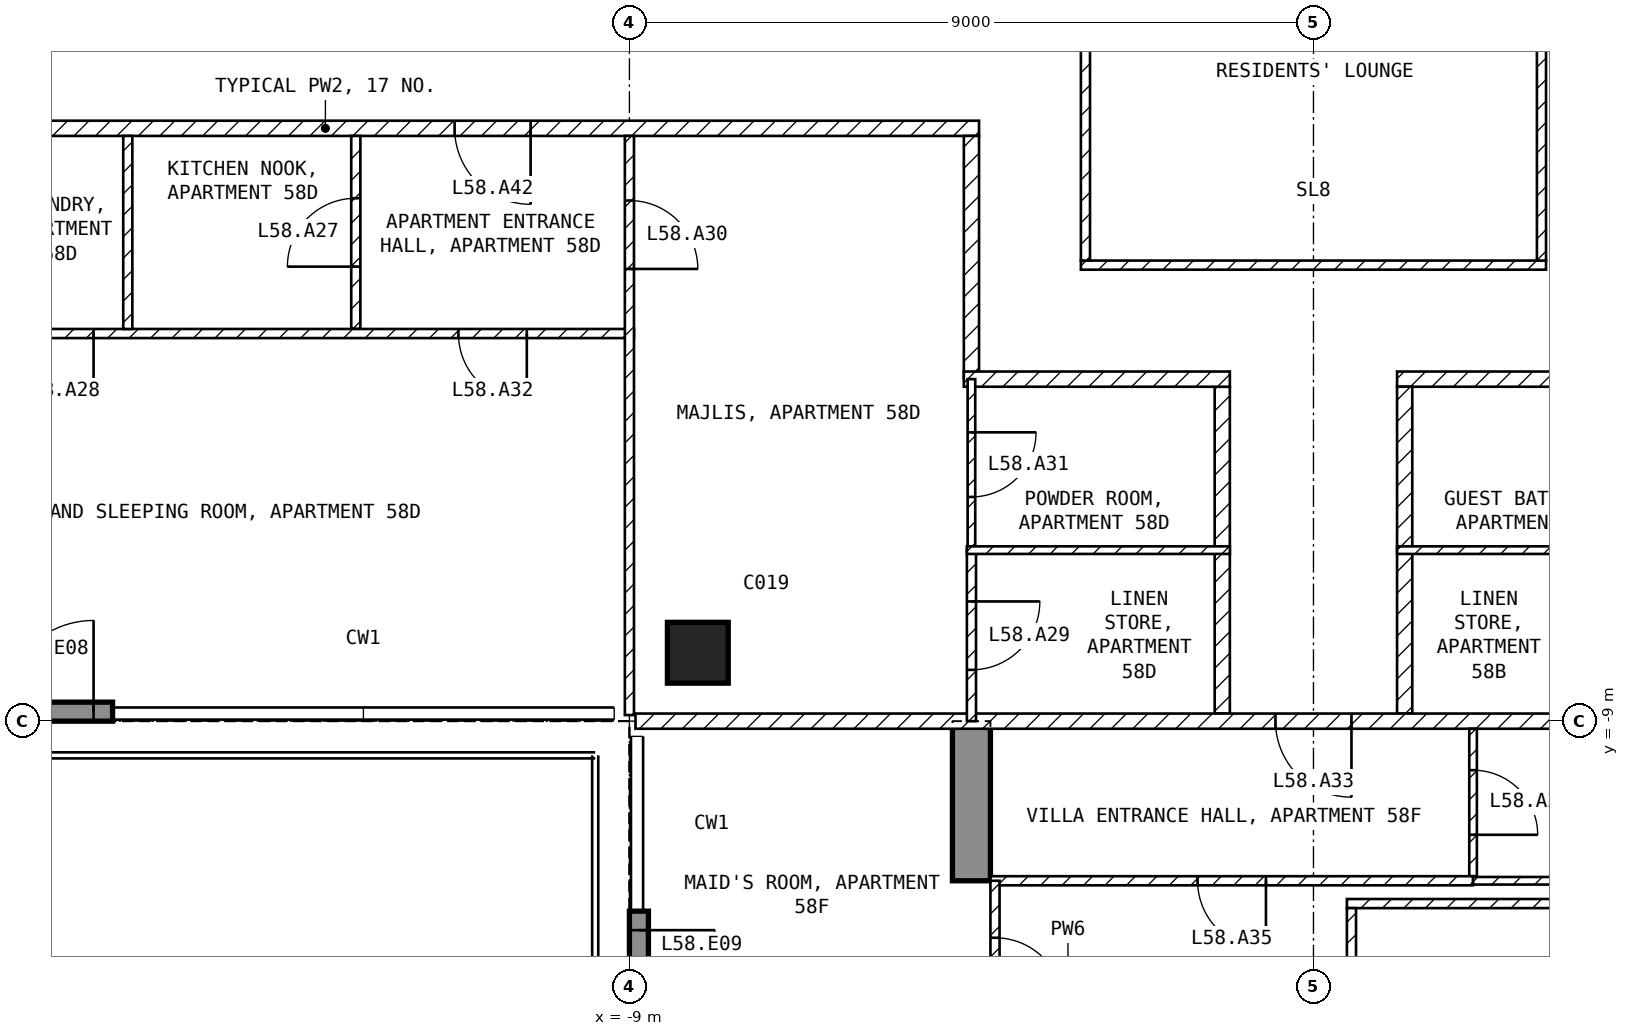
"""IFC4 building model, lengths in metres.
Left out: names, types, materials, properties, quantities, classifications, styles, units other than length and angle.
Written with IfcOpenShell. Run it as: python <this file> out.ifc"""

import sys

from ifc_helpers import new_model, si_unit, direction, frame, frame_2d, origin, origin_2d, place, context, subcontext, project, spatial, polyline, rectangle, outline, extrude, element, fill, save


model = new_model("IFC4")
c1 = context("Model", 3, precision=1e-05, world=origin(), true_north=direction((0.0, 1.0)))
c2 = subcontext(c1, "Body", "Model", "MODEL_VIEW")
j1 = project(units=[si_unit("LENGTHUNIT", "METRE"), si_unit("PLANEANGLEUNIT", "RADIAN")], contexts=[c1])
p1 = place(None, origin())
s1 = spatial("IfcSite", under=j1, at=p1, CompositionType="ELEMENT")
p2 = place(p1, origin())
s2 = spatial("IfcBuilding", under=s1, at=p2, CompositionType="ELEMENT")
p3 = place(p2, frame((0.0, 0.0, 232.5)))
s3 = spatial("IfcBuildingStorey", under=s2, at=p3, CompositionType="ELEMENT", Elevation=232.5)
p4 = place(p3, frame((-8.1, -8.1, -0.25), z_axis=(0.0, 0.0, 1.0), x_axis=(1.0, 0.0, 0.0)))
e1 = element("IfcColumn", 1, at=p4, inside=s3, PredefinedType="COLUMN", context=c2, shape_type="SweptSolid", body=[
    extrude(rectangle(XDim=0.8, YDim=0.8, at=origin_2d()), origin(), (0.0, 0.0, 1.0), 3.5),
])
p5 = place(p3, frame((-4.75, -16.7, -0.25), z_axis=(1.0, 0.0, 0.0), x_axis=(0.0, 1.0, 0.0)))
e2 = element("IfcWall", 2, at=p5, inside=s3, PredefinedType="SHEAR", context=c2, shape_type="SweptSolid", body=[
    extrude(outline(polyline([(0.0, 0.0), (3.2, 0.0), (3.2, 2.65), (5.6, 2.65), (5.6, 0.0), (7.7, 0.0), (7.7, 3.5), (0.0, 3.5), (0.0, 0.0)])), origin(), (0.0, 0.0, 1.0), 0.5),
])
p6 = place(p3, frame((-17.8, -8.875, 0.0), z_axis=(0.0, 0.0, 1.0), x_axis=(1.0, 0.0, 0.0)))
e3 = element("IfcWall", 3, at=p6, inside=s3, PredefinedType="SOLIDWALL", context=c2, shape_type="SweptSolid", body=[
    extrude(rectangle(XDim=2.0, YDim=0.25, at=frame_2d((1.0, 0.0))), origin(), (0.0, 0.0, 1.0), 3.25),
])
p7 = place(p6, frame((0.55, 0.0, 0.0)))
e4 = element("IfcOpeningElement", 4, at=p7, cuts=e3, PredefinedType="OPENING", context=c2, shape_type="SweptSolid", body=[
    extrude(rectangle(XDim=1.2, YDim=2.4, at=frame_2d((0.6, 1.2))), frame((0.0, 0.135, 0.0), z_axis=(0.0, -1.0, 0.0), x_axis=(1.0, 0.0, 0.0)), (0.0, 0.0, 1.0), 0.27),
])
p8 = place(p3, frame((-8.875, -11.5, 0.0), z_axis=(0.0, 0.0, 1.0), x_axis=(0.0, -1.0, 0.0)))
e5 = element("IfcWall", 5, at=p8, inside=s3, PredefinedType="SOLIDWALL", context=c2, shape_type="SweptSolid", body=[
    extrude(rectangle(XDim=2.7, YDim=0.25, at=frame_2d((1.35, 0.0))), origin(), (0.0, 0.0, 1.0), 3.25),
])
p9 = place(p8, frame((0.25, 0.0, 0.0)))
e6 = element("IfcOpeningElement", 6, at=p9, cuts=e5, PredefinedType="OPENING", context=c2, shape_type="SweptSolid", body=[
    extrude(rectangle(XDim=1.0, YDim=2.4, at=frame_2d((0.5, 1.2))), frame((0.0, 0.135, 0.0), z_axis=(0.0, -1.0, 0.0), x_axis=(1.0, 0.0, 0.0)), (0.0, 0.0, 1.0), 0.27),
])
p10 = place(p3, frame((-3.06, -3.0, 0.0), z_axis=(0.0, 0.0, 1.0), x_axis=(1.0, 0.0, 0.0)))
e7 = element("IfcWall", 7, at=p10, inside=s3, PredefinedType="PARTITIONING", context=c2, shape_type="SweptSolid", body=[
    extrude(rectangle(XDim=6.12, YDim=0.12, at=frame_2d((3.06, 0.0))), origin(), (0.0, 0.0, 1.0), 3.25),
])
for number, where, z_axis, x_axis in (
    (8, (3.0, -2.94, 0.0), (0.0, 0.0, 1.0), (0.0, 1.0, 0.0)),
    (9, (-3.0, 2.94, 0.0), (0.0, 0.0, 1.0), (0.0, -1.0, 0.0)),
):
    element("IfcWall", number, at=place(p3, frame(where, z_axis=z_axis, x_axis=x_axis)), inside=s3, PredefinedType="PARTITIONING", context=c2, shape_type="SweptSolid", body=[
        extrude(rectangle(XDim=5.88, YDim=0.12, at=frame_2d((2.94, 0.0))), origin(), (0.0, 0.0, 1.0), 3.25),
    ])
p11 = place(p3, frame((4.6, -4.5, 0.0), z_axis=(0.0, 0.0, 1.0), x_axis=(-1.0, 0.0, 0.0)))
e10 = element("IfcWall", 10, at=p11, inside=s3, PredefinedType="PARTITIONING", context=c2, shape_type="SweptSolid", body=[
    extrude(rectangle(XDim=3.5, YDim=0.2, at=frame_2d((1.75, 0.0))), origin(), (0.0, 0.0, 1.0), 3.25),
])
p12 = place(p3, frame((1.2, -4.6, 0.0), z_axis=(0.0, 0.0, 1.0), x_axis=(0.0, -1.0, 0.0)))
e11 = element("IfcWall", 11, at=p12, inside=s3, PredefinedType="PARTITIONING", context=c2, shape_type="SweptSolid", body=[
    extrude(rectangle(XDim=4.3, YDim=0.2, at=frame_2d((2.15, 0.0))), origin(), (0.0, 0.0, 1.0), 3.25),
])
p13 = place(p3, frame((-4.4, -1.2, 0.0), z_axis=(0.0, 0.0, 1.0), x_axis=(-1.0, 0.0, 0.0)))
e12 = element("IfcWall", 12, at=p13, inside=s3, PredefinedType="PARTITIONING", context=c2, shape_type="SweptSolid", body=[
    extrude(rectangle(XDim=17.2, YDim=0.2, at=frame_2d((8.6, 0.0))), origin(), (0.0, 0.0, 1.0), 3.25),
])
p14 = place(p13, frame((5.9, 0.0, 0.0)))
e13 = element("IfcOpeningElement", 13, at=p14, cuts=e12, PredefinedType="OPENING", context=c2, shape_type="SweptSolid", body=[
    extrude(rectangle(XDim=1.0, YDim=2.1, at=frame_2d((0.5, 1.05))), frame((0.0, 0.11, 0.0), z_axis=(0.0, -1.0, 0.0), x_axis=(1.0, 0.0, 0.0)), (0.0, 0.0, 1.0), 0.22),
])
p15 = place(p3, frame((-4.5, -4.5, 0.0), z_axis=(0.0, 0.0, 1.0), x_axis=(0.0, 1.0, 0.0)))
e14 = element("IfcWall", 14, at=p15, inside=s3, PredefinedType="PARTITIONING", context=c2, shape_type="SweptSolid", body=[
    extrude(rectangle(XDim=3.2, YDim=0.2, at=frame_2d((1.6, 0.0))), origin(), (0.0, 0.0, 1.0), 3.25),
])
p16 = place(p3, frame((-1.2, -8.9, 0.0), z_axis=(0.0, 0.0, 1.0), x_axis=(0.0, 1.0, 0.0)))
e15 = element("IfcWall", 15, at=p16, inside=s3, PredefinedType="PARTITIONING", context=c2, shape_type="SweptSolid", body=[
    extrude(rectangle(XDim=4.3, YDim=0.2, at=frame_2d((2.15, 0.0))), origin(), (0.0, 0.0, 1.0), 3.25),
])
p17 = place(p3, frame((-1.1, -4.5, 0.0), z_axis=(0.0, 0.0, 1.0), x_axis=(-1.0, 0.0, 0.0)))
e16 = element("IfcWall", 16, at=p17, inside=s3, PredefinedType="PARTITIONING", context=c2, shape_type="SweptSolid", body=[
    extrude(rectangle(XDim=3.5, YDim=0.2, at=frame_2d((1.75, 0.0))), origin(), (0.0, 0.0, 1.0), 3.25),
])
p18 = place(p3, frame((8.92, -9.0, 0.0), z_axis=(0.0, 0.0, 1.0), x_axis=(-1.0, 0.0, 0.0)))
e17 = element("IfcWall", 17, at=p18, inside=s3, PredefinedType="PARTITIONING", context=c2, shape_type="SweptSolid", body=[
    extrude(rectangle(XDim=17.84, YDim=0.2, at=frame_2d((8.92, 0.0))), origin(), (0.0, 0.0, 1.0), 3.25),
])
p19 = place(p18, frame((8.42, 0.0, 0.0)))
e18 = element("IfcOpeningElement", 18, at=p19, cuts=e17, PredefinedType="OPENING", context=c2, shape_type="SweptSolid", body=[
    extrude(rectangle(XDim=1.0, YDim=2.1, at=frame_2d((0.5, 1.05))), frame((0.0, 0.11, 0.0), z_axis=(0.0, -1.0, 0.0), x_axis=(1.0, 0.0, 0.0)), (0.0, 0.0, 1.0), 0.22),
])
p20 = place(p3, frame((4.56, -6.75, 0.0), z_axis=(0.0, 0.0, 1.0), x_axis=(-1.0, 0.0, 0.0)))
e19 = element("IfcWall", 19, at=p20, inside=s3, PredefinedType="PARTITIONING", context=c2, shape_type="SweptSolid", body=[
    extrude(rectangle(XDim=3.46, YDim=0.1, at=frame_2d((1.73, 0.0))), origin(), (0.0, 0.0, 1.0), 3.25),
])
p21 = place(p3, frame((-12.6, -3.84, 0.0), z_axis=(0.0, 0.0, 1.0), x_axis=(0.0, 1.0, 0.0)))
e20 = element("IfcWall", 20, at=p21, inside=s3, PredefinedType="PARTITIONING", context=c2, shape_type="SweptSolid", body=[
    extrude(rectangle(XDim=2.54, YDim=0.12, at=frame_2d((1.27, 0.0))), origin(), (0.0, 0.0, 1.0), 3.25),
])
p22 = place(p21, frame((0.82, 0.0, 0.0)))
e21 = element("IfcOpeningElement", 21, at=p22, cuts=e20, PredefinedType="OPENING", context=c2, shape_type="SweptSolid", body=[
    extrude(rectangle(XDim=0.9, YDim=2.1, at=frame_2d((0.45, 1.05))), frame((0.0, 0.07, 0.0), z_axis=(0.0, -1.0, 0.0), x_axis=(1.0, 0.0, 0.0)), (0.0, 0.0, 1.0), 0.14),
])
p23 = place(p3, frame((-8.94, -3.9, 0.0), z_axis=(0.0, 0.0, 1.0), x_axis=(-1.0, 0.0, 0.0)))
e22 = element("IfcWall", 22, at=p23, inside=s3, PredefinedType="PARTITIONING", context=c2, shape_type="SweptSolid", body=[
    extrude(rectangle(XDim=8.46, YDim=0.12, at=frame_2d((4.23, 0.0))), origin(), (0.0, 0.0, 1.0), 3.25),
])
p24 = place(p23, frame((7.11, 0.0, 0.0)))
e23 = element("IfcOpeningElement", 23, at=p24, cuts=e22, PredefinedType="OPENING", context=c2, shape_type="SweptSolid", body=[
    extrude(rectangle(XDim=0.9, YDim=2.1, at=frame_2d((0.45, 1.05))), frame((0.0, 0.07, 0.0), z_axis=(0.0, -1.0, 0.0), x_axis=(1.0, 0.0, 0.0)), (0.0, 0.0, 1.0), 0.14),
])
p25 = place(p23, frame((1.41, 0.0, 0.0)))
e24 = element("IfcOpeningElement", 24, at=p25, cuts=e22, PredefinedType="OPENING", context=c2, shape_type="SweptSolid", body=[
    extrude(rectangle(XDim=0.9, YDim=2.1, at=frame_2d((0.45, 1.05))), frame((0.0, 0.07, 0.0), z_axis=(0.0, -1.0, 0.0), x_axis=(1.0, 0.0, 0.0)), (0.0, 0.0, 1.0), 0.14),
])
p26 = place(p3, frame((-9.0, -1.3, 0.0), z_axis=(0.0, 0.0, 1.0), x_axis=(0.0, -1.0, 0.0)))
e25 = element("IfcWall", 25, at=p26, inside=s3, PredefinedType="PARTITIONING", context=c2, shape_type="SweptSolid", body=[
    extrude(rectangle(XDim=7.62, YDim=0.12, at=frame_2d((3.81, 0.0))), origin(), (0.0, 0.0, 1.0), 3.25),
])
p27 = place(p26, frame((0.85, 0.0, 0.0)))
e26 = element("IfcOpeningElement", 26, at=p27, cuts=e25, PredefinedType="OPENING", context=c2, shape_type="SweptSolid", body=[
    extrude(rectangle(XDim=0.9, YDim=2.1, at=frame_2d((0.45, 1.05))), frame((0.0, 0.07, 0.0), z_axis=(0.0, -1.0, 0.0), x_axis=(1.0, 0.0, 0.0)), (0.0, 0.0, 1.0), 0.14),
])
p28 = place(p3, frame((-15.6, -3.84, 0.0), z_axis=(0.0, 0.0, 1.0), x_axis=(0.0, 1.0, 0.0)))
e27 = element("IfcWall", 27, at=p28, inside=s3, PredefinedType="PARTITIONING", context=c2, shape_type="SweptSolid", body=[
    extrude(rectangle(XDim=2.54, YDim=0.12, at=frame_2d((1.27, 0.0))), origin(), (0.0, 0.0, 1.0), 3.25),
])
p29 = place(p3, frame((-4.5, -4.5, 0.0), z_axis=(0.0, 0.0, 1.0), x_axis=(0.0, -1.0, 0.0)))
e28 = element("IfcWall", 28, at=p29, inside=s3, PredefinedType="PARTITIONING", context=c2, shape_type="SweptSolid", body=[
    extrude(rectangle(XDim=2.25, YDim=0.1, at=frame_2d((1.125, 0.0))), origin(), (0.0, 0.0, 1.0), 3.25),
])
p30 = place(p29, frame((0.7, 0.0, 0.0)))
e29 = element("IfcOpeningElement", 29, at=p30, cuts=e28, PredefinedType="OPENING", context=c2, shape_type="SweptSolid", body=[
    extrude(rectangle(XDim=0.85, YDim=2.1, at=frame_2d((0.425, 1.05))), frame((0.0, 0.06, 0.0), z_axis=(0.0, -1.0, 0.0), x_axis=(1.0, 0.0, 0.0)), (0.0, 0.0, 1.0), 0.12),
])
p31 = place(p3, frame((-4.5, -6.75, 0.0), z_axis=(0.0, 0.0, 1.0), x_axis=(0.0, -1.0, 0.0)))
e30 = element("IfcWall", 30, at=p31, inside=s3, PredefinedType="PARTITIONING", context=c2, shape_type="SweptSolid", body=[
    extrude(rectangle(XDim=2.25, YDim=0.12, at=frame_2d((1.125, 0.0))), origin(), (0.0, 0.0, 1.0), 3.25),
])
p32 = place(p31, frame((0.675, 0.0, 0.0)))
e31 = element("IfcOpeningElement", 31, at=p32, cuts=e30, PredefinedType="OPENING", context=c2, shape_type="SweptSolid", body=[
    extrude(rectangle(XDim=0.9, YDim=2.1, at=frame_2d((0.45, 1.05))), frame((0.0, 0.07, 0.0), z_axis=(0.0, -1.0, 0.0), x_axis=(1.0, 0.0, 0.0)), (0.0, 0.0, 1.0), 0.14),
])
p33 = place(p3, frame((-1.1, -6.75, 0.0), z_axis=(0.0, 0.0, 1.0), x_axis=(-1.0, 0.0, 0.0)))
e32 = element("IfcWall", 32, at=p33, inside=s3, PredefinedType="PARTITIONING", context=c2, shape_type="SweptSolid", body=[
    extrude(rectangle(XDim=3.46, YDim=0.1, at=frame_2d((1.73, 0.0))), origin(), (0.0, 0.0, 1.0), 3.25),
])
p34 = place(p3, frame((2.1, -9.1, 0.0), z_axis=(0.0, 0.0, 1.0), x_axis=(0.0, -1.0, 0.0)))
e33 = element("IfcWall", 33, at=p34, inside=s3, PredefinedType="PARTITIONING", context=c2, shape_type="SweptSolid", body=[
    extrude(rectangle(XDim=1.94, YDim=0.1, at=frame_2d((0.97, 0.0))), origin(), (0.0, 0.0, 1.0), 3.25),
])
p35 = place(p34, frame((0.545, 0.0, 0.0)))
e34 = element("IfcOpeningElement", 34, at=p35, cuts=e33, PredefinedType="OPENING", context=c2, shape_type="SweptSolid", body=[
    extrude(rectangle(XDim=0.85, YDim=2.1, at=frame_2d((0.425, 1.05))), frame((0.0, 0.06, 0.0), z_axis=(0.0, -1.0, 0.0), x_axis=(1.0, 0.0, 0.0)), (0.0, 0.0, 1.0), 0.12),
])
p36 = place(p3, frame((2.1, -11.1, 0.0), z_axis=(0.0, 0.0, 1.0), x_axis=(-1.0, 0.0, 0.0)))
e35 = element("IfcWall", 35, at=p36, inside=s3, PredefinedType="PARTITIONING", context=c2, shape_type="SweptSolid", body=[
    extrude(rectangle(XDim=6.35, YDim=0.12, at=frame_2d((3.175, 0.0))), origin(), (0.0, 0.0, 1.0), 3.25),
])
p37 = place(p36, frame((2.725, 0.0, 0.0)))
e36 = element("IfcOpeningElement", 36, at=p37, cuts=e35, PredefinedType="OPENING", context=c2, shape_type="SweptSolid", body=[
    extrude(rectangle(XDim=0.9, YDim=2.1, at=frame_2d((0.45, 1.05))), frame((0.0, 0.07, 0.0), z_axis=(0.0, -1.0, 0.0), x_axis=(1.0, 0.0, 0.0)), (0.0, 0.0, 1.0), 0.14),
])
p38 = place(p3, frame((4.25, -11.1, 0.0), z_axis=(0.0, 0.0, 1.0), x_axis=(-1.0, 0.0, 0.0)))
e37 = element("IfcWall", 37, at=p38, inside=s3, PredefinedType="PARTITIONING", context=c2, shape_type="SweptSolid", body=[
    extrude(rectangle(XDim=2.15, YDim=0.1, at=frame_2d((1.075, 0.0))), origin(), (0.0, 0.0, 1.0), 3.25),
])
p39 = place(p3, frame((4.25, -11.4, 0.0), z_axis=(0.0, 0.0, 1.0), x_axis=(-1.0, 0.0, 0.0)))
e38 = element("IfcWall", 38, at=p39, inside=s3, PredefinedType="PARTITIONING", context=c2, shape_type="SweptSolid", body=[
    extrude(rectangle(XDim=3.81, YDim=0.12, at=frame_2d((1.905, 0.0))), origin(), (0.0, 0.0, 1.0), 3.25),
])
p40 = place(p3, frame((0.5, -11.46, 0.0), z_axis=(0.0, 0.0, 1.0), x_axis=(0.0, -1.0, 0.0)))
e39 = element("IfcWall", 39, at=p40, inside=s3, PredefinedType="PARTITIONING", context=c2, shape_type="SweptSolid", body=[
    extrude(rectangle(XDim=2.88, YDim=0.12, at=frame_2d((1.44, 0.0))), origin(), (0.0, 0.0, 1.0), 3.25),
])
p41 = place(p40, frame((0.99, 0.0, 0.0)))
e40 = element("IfcOpeningElement", 40, at=p41, cuts=e39, PredefinedType="OPENING", context=c2, shape_type="SweptSolid", body=[
    extrude(rectangle(XDim=0.9, YDim=2.1, at=frame_2d((0.45, 1.05))), frame((0.0, 0.07, 0.0), z_axis=(0.0, -1.0, 0.0), x_axis=(1.0, 0.0, 0.0)), (0.0, 0.0, 1.0), 0.14),
])
p42 = place(p3, frame((-4.19, -11.1, 0.0), z_axis=(0.0, 0.0, 1.0), x_axis=(0.0, -1.0, 0.0)))
e41 = element("IfcWall", 41, at=p42, inside=s3, PredefinedType="PARTITIONING", context=c2, shape_type="SweptSolid", body=[
    extrude(rectangle(XDim=2.4, YDim=0.12, at=frame_2d((1.2, 0.0))), origin(), (0.0, 0.0, 1.0), 2.4),
])
p43 = place(p42, frame((0.75, 0.0, 0.0)))
e42 = element("IfcOpeningElement", 42, at=p43, cuts=e41, PredefinedType="OPENING", context=c2, shape_type="SweptSolid", body=[
    extrude(rectangle(XDim=0.9, YDim=2.1, at=frame_2d((0.45, 1.05))), frame((0.0, 0.07, 0.0), z_axis=(0.0, -1.0, 0.0), x_axis=(1.0, 0.0, 0.0)), (0.0, 0.0, 1.0), 0.14),
])
p44 = place(p7, origin())
e43 = element("IfcDoor", 43, at=p44, inside=s3, OperationType="SINGLE_SWING_RIGHT", PredefinedType="DOOR", context=c2, shape_type="SweptSolid", body=[
    extrude(rectangle(XDim=1.2, YDim=2.4, at=frame_2d((0.6, 1.2))), frame((0.0, 0.025, 0.0), z_axis=(0.0, -1.0, 0.0), x_axis=(1.0, 0.0, 0.0)), (0.0, 0.0, 1.0), 0.05),
])
fill(e4, e43)
p45 = place(p9, origin())
e44 = element("IfcDoor", 44, at=p45, inside=s3, OperationType="SINGLE_SWING_LEFT", PredefinedType="DOOR", context=c2, shape_type="SweptSolid", body=[
    extrude(rectangle(XDim=1.0, YDim=2.4, at=frame_2d((0.5, 1.2))), frame((0.0, 0.025, 0.0), z_axis=(0.0, -1.0, 0.0), x_axis=(1.0, 0.0, 0.0)), (0.0, 0.0, 1.0), 0.05),
])
fill(e6, e44)
p46 = place(p22, origin())
e45 = element("IfcDoor", 45, at=p46, inside=s3, OperationType="SINGLE_SWING_LEFT", PredefinedType="DOOR", context=c2, shape_type="SweptSolid", body=[
    extrude(rectangle(XDim=0.9, YDim=2.1, at=frame_2d((0.45, 1.05))), frame((0.0, 0.025, 0.0), z_axis=(0.0, -1.0, 0.0), x_axis=(1.0, 0.0, 0.0)), (0.0, 0.0, 1.0), 0.05),
])
fill(e21, e45)
p47 = place(p24, origin())
e46 = element("IfcDoor", 46, at=p47, inside=s3, OperationType="SINGLE_SWING_LEFT", PredefinedType="DOOR", context=c2, shape_type="SweptSolid", body=[
    extrude(rectangle(XDim=0.9, YDim=2.1, at=frame_2d((0.45, 1.05))), frame((0.0, 0.025, 0.0), z_axis=(0.0, -1.0, 0.0), x_axis=(1.0, 0.0, 0.0)), (0.0, 0.0, 1.0), 0.05),
])
fill(e23, e46)
p48 = place(p32, origin())
e47 = element("IfcDoor", 47, at=p48, inside=s3, OperationType="SINGLE_SWING_LEFT", PredefinedType="DOOR", context=c2, shape_type="SweptSolid", body=[
    extrude(rectangle(XDim=0.9, YDim=2.1, at=frame_2d((0.45, 1.05))), frame((0.0, 0.025, 0.0), z_axis=(0.0, -1.0, 0.0), x_axis=(1.0, 0.0, 0.0)), (0.0, 0.0, 1.0), 0.05),
])
fill(e31, e47)
p49 = place(p27, origin())
e48 = element("IfcDoor", 48, at=p49, inside=s3, OperationType="SINGLE_SWING_RIGHT", PredefinedType="DOOR", context=c2, shape_type="SweptSolid", body=[
    extrude(rectangle(XDim=0.9, YDim=2.1, at=frame_2d((0.45, 1.05))), frame((0.0, 0.025, 0.0), z_axis=(0.0, -1.0, 0.0), x_axis=(1.0, 0.0, 0.0)), (0.0, 0.0, 1.0), 0.05),
])
fill(e26, e48)
p50 = place(p30, origin())
e49 = element("IfcDoor", 49, at=p50, inside=s3, OperationType="SINGLE_SWING_LEFT", PredefinedType="DOOR", context=c2, shape_type="SweptSolid", body=[
    extrude(rectangle(XDim=0.85, YDim=2.1, at=frame_2d((0.425, 1.05))), frame((0.0, 0.025, 0.0), z_axis=(0.0, -1.0, 0.0), x_axis=(1.0, 0.0, 0.0)), (0.0, 0.0, 1.0), 0.05),
])
fill(e29, e49)
p51 = place(p25, origin())
e50 = element("IfcDoor", 50, at=p51, inside=s3, OperationType="SINGLE_SWING_LEFT", PredefinedType="DOOR", context=c2, shape_type="SweptSolid", body=[
    extrude(rectangle(XDim=0.9, YDim=2.1, at=frame_2d((0.45, 1.05))), frame((0.0, 0.025, 0.0), z_axis=(0.0, -1.0, 0.0), x_axis=(1.0, 0.0, 0.0)), (0.0, 0.0, 1.0), 0.05),
])
fill(e24, e50)
p52 = place(p19, origin())
e51 = element("IfcDoor", 51, at=p52, inside=s3, OperationType="SINGLE_SWING_LEFT", PredefinedType="DOOR", context=c2, shape_type="SweptSolid", body=[
    extrude(rectangle(XDim=1.0, YDim=2.1, at=frame_2d((0.5, 1.05))), frame((0.0, 0.025, 0.0), z_axis=(0.0, -1.0, 0.0), x_axis=(1.0, 0.0, 0.0)), (0.0, 0.0, 1.0), 0.05),
])
fill(e18, e51)
p53 = place(p35, origin())
e52 = element("IfcDoor", 52, at=p53, inside=s3, OperationType="SINGLE_SWING_RIGHT", PredefinedType="DOOR", context=c2, shape_type="SweptSolid", body=[
    extrude(rectangle(XDim=0.85, YDim=2.1, at=frame_2d((0.425, 1.05))), frame((0.0, 0.025, 0.0), z_axis=(0.0, -1.0, 0.0), x_axis=(1.0, 0.0, 0.0)), (0.0, 0.0, 1.0), 0.05),
])
fill(e34, e52)
p54 = place(p37, origin())
e53 = element("IfcDoor", 53, at=p54, inside=s3, OperationType="SINGLE_SWING_LEFT", PredefinedType="DOOR", context=c2, shape_type="SweptSolid", body=[
    extrude(rectangle(XDim=0.9, YDim=2.1, at=frame_2d((0.45, 1.05))), frame((0.0, 0.025, 0.0), z_axis=(0.0, -1.0, 0.0), x_axis=(1.0, 0.0, 0.0)), (0.0, 0.0, 1.0), 0.05),
])
fill(e36, e53)
p55 = place(p14, origin())
e54 = element("IfcDoor", 54, at=p55, inside=s3, OperationType="SINGLE_SWING_LEFT", PredefinedType="DOOR", context=c2, shape_type="SweptSolid", body=[
    extrude(rectangle(XDim=1.0, YDim=2.1, at=frame_2d((0.5, 1.05))), frame((0.0, 0.025, 0.0), z_axis=(0.0, -1.0, 0.0), x_axis=(1.0, 0.0, 0.0)), (0.0, 0.0, 1.0), 0.05),
])
fill(e13, e54)
p56 = place(p43, origin())
e55 = element("IfcDoor", 55, at=p56, inside=s3, OperationType="SINGLE_SWING_RIGHT", PredefinedType="DOOR", context=c2, shape_type="SweptSolid", body=[
    extrude(rectangle(XDim=0.9, YDim=2.1, at=frame_2d((0.45, 1.05))), frame((0.0, 0.025, 0.0), z_axis=(0.0, -1.0, 0.0), x_axis=(1.0, 0.0, 0.0)), (0.0, 0.0, 1.0), 0.05),
])
fill(e42, e55)
save(model, sys.argv[1])
